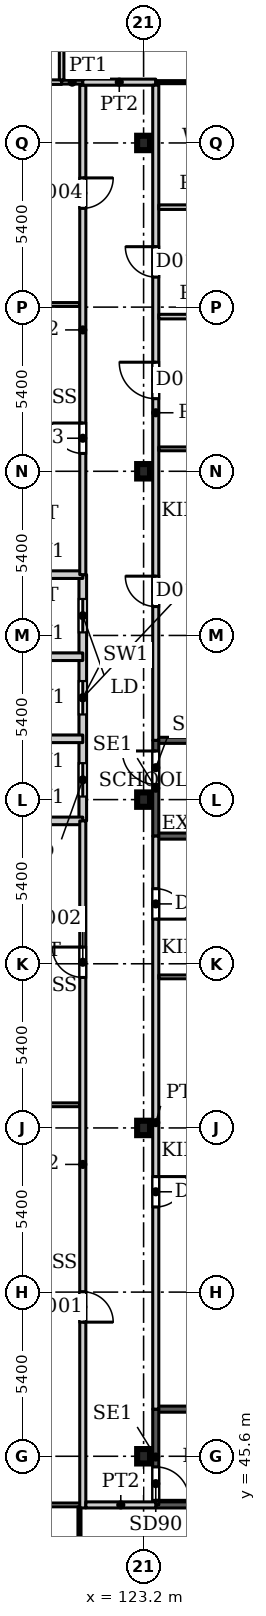
"""IFC4 building model, lengths in metres.
Left out: names, types, materials, properties, quantities, classifications, styles, units other than length and angle.
Written with IfcOpenShell. Run it as: python <this file> out.ifc"""

import sys

from ifc_helpers import new_model, si_unit, direction, frame, frame_2d, origin, origin_2d, place, context, subcontext, project, spatial, rectangle, i_section, extrude, source, transform, mapped, element, fill, save


model = new_model("IFC4")
c1 = context("Model", 3, precision=1e-05, world=origin(), true_north=direction((0.0, 1.0)))
c2 = subcontext(c1, "Body", "Model", "MODEL_VIEW")
j1 = project(units=[si_unit("LENGTHUNIT", "METRE"), si_unit("PLANEANGLEUNIT", "RADIAN")], contexts=[c1])
p1 = place(None, origin())
s1 = spatial("IfcSite", under=j1, at=p1, CompositionType="ELEMENT")
p2 = place(p1, origin())
s2 = spatial("IfcBuilding", under=s1, at=p2, CompositionType="ELEMENT")
p3 = place(p2, frame((0.0, 0.0, 7.5)))
s3 = spatial("IfcBuildingStorey", under=s2, at=p3, CompositionType="ELEMENT", Elevation=7.5)
for number, where, z_axis, x_axis in (
    (1, (123.2, 45.6, 0.0), (0.0, 0.0, 1.0), (1.0, 0.0, 0.0)),
    (2, (123.2, 56.4, 0.0), (0.0, 0.0, 1.0), (1.0, 0.0, 0.0)),
    (3, (123.2, 67.2, 0.0), (0.0, 0.0, 1.0), (1.0, 0.0, 0.0)),
    (4, (123.2, 78.0, 0.0), (0.0, 0.0, 1.0), (1.0, 0.0, 0.0)),
    (5, (123.2, 88.8, 0.0), (0.0, 0.0, 1.0), (1.0, 0.0, 0.0)),
):
    element("IfcColumn", number, at=place(p3, frame(where, z_axis=z_axis, x_axis=x_axis)), inside=s3, PredefinedType="COLUMN", context=c2, shape_type="SweptSolid", body=[
        extrude(i_section(OverallWidth=0.424, OverallDepth=0.474, WebThickness=0.048, FlangeThickness=0.077, FilletRadius=0.014, at=origin_2d()), origin(), (0.0, 0.0, 1.0), 5.0),
    ])
p4 = place(p3, frame((121.2, 66.5, 0.0), z_axis=(0.0, 0.0, 1.0), x_axis=(0.0, 1.0, 0.0)))
e6 = element("IfcWall", 6, at=p4, inside=s3, PredefinedType="PARTITIONING", context=c2, shape_type="SweptSolid", body=[
    extrude(rectangle(XDim=8.1, YDim=0.25, at=frame_2d((4.05, 0.0))), origin(), (0.0, 0.0, 1.0), 5.0),
])
p5 = place(p4, frame((0.8, 0.0, 0.0)))
e7 = element("IfcOpeningElement", 7, at=p5, cuts=e6, PredefinedType="OPENING", context=c2, shape_type="SweptSolid", body=[
    extrude(rectangle(XDim=1.1, YDim=2.2, at=frame_2d((0.55, 1.1))), frame((0.0, 0.135, 0.0), z_axis=(0.0, -1.0, 0.0), x_axis=(1.0, 0.0, 0.0)), (0.0, 0.0, 1.0), 0.27),
])
p6 = place(p4, frame((3.5, 0.0, 0.0)))
e8 = element("IfcOpeningElement", 8, at=p6, cuts=e6, PredefinedType="OPENING", context=c2, shape_type="SweptSolid", body=[
    extrude(rectangle(XDim=1.1, YDim=2.2, at=frame_2d((0.55, 1.1))), frame((0.0, 0.135, 0.0), z_axis=(0.0, -1.0, 0.0), x_axis=(1.0, 0.0, 0.0)), (0.0, 0.0, 1.0), 0.27),
])
p7 = place(p4, frame((6.2, 0.0, 0.0)))
e9 = element("IfcOpeningElement", 9, at=p7, cuts=e6, PredefinedType="OPENING", context=c2, shape_type="SweptSolid", body=[
    extrude(rectangle(XDim=1.1, YDim=2.2, at=frame_2d((0.55, 1.1))), frame((0.0, 0.135, 0.0), z_axis=(0.0, -1.0, 0.0), x_axis=(1.0, 0.0, 0.0)), (0.0, 0.0, 1.0), 0.27),
])
for number, where, z_axis, x_axis in (
    (10, (118.5, 66.5, 0.0), (0.0, 0.0, 1.0), (1.0, 0.0, 0.0)),
    (11, (118.5, 69.2, 0.0), (0.0, 0.0, 1.0), (1.0, 0.0, 0.0)),
    (12, (118.5, 71.9, 0.0), (0.0, 0.0, 1.0), (1.0, 0.0, 0.0)),
    (13, (118.5, 74.6, 0.0), (0.0, 0.0, 1.0), (1.0, 0.0, 0.0)),
):
    element("IfcWall", number, at=place(p3, frame(where, z_axis=z_axis, x_axis=x_axis)), inside=s3, PredefinedType="PARTITIONING", context=c2, shape_type="SweptSolid", body=[
        extrude(rectangle(XDim=2.7, YDim=0.25, at=frame_2d((1.35, 0.0))), origin(), (0.0, 0.0, 1.0), 5.0),
    ])
p8 = place(p3, frame((123.6, 44.0, 0.0), z_axis=(0.0, 0.0, 1.0), x_axis=(1.0, 0.0, 0.0)))
e14 = element("IfcWall", 14, at=p8, inside=s3, PredefinedType="SHEAR", context=c2, shape_type="SweptSolid", body=[
    extrude(rectangle(XDim=7.2, YDim=0.2, at=frame_2d((3.6, 0.0))), origin(), (0.0, 0.0, 1.0), 5.0),
])
p9 = place(p3, frame((123.6, 47.15, 0.0), z_axis=(0.0, 0.0, 1.0), x_axis=(1.0, 0.0, 0.0)))
e15 = element("IfcWall", 15, at=p9, inside=s3, PredefinedType="SHEAR", context=c2, shape_type="SweptSolid", body=[
    extrude(rectangle(XDim=8.4, YDim=0.2, at=frame_2d((4.2, 0.0))), origin(), (0.0, 0.0, 1.0), 5.0),
])
p10 = place(p3, frame((123.6, 44.0, 0.0), z_axis=(0.0, 0.0, 1.0), x_axis=(0.0, 1.0, 0.0)))
e16 = element("IfcWall", 16, at=p10, inside=s3, PredefinedType="SHEAR", context=c2, shape_type="SweptSolid", body=[
    extrude(rectangle(XDim=3.15, YDim=0.2, at=frame_2d((1.575, 0.0))), origin(), (0.0, 0.0, 1.0), 5.0),
])
p11 = place(p10, frame((0.15, 0.0, 0.0)))
e17 = element("IfcOpeningElement", 17, at=p11, cuts=e16, PredefinedType="OPENING", context=c2, shape_type="SweptSolid", body=[
    extrude(rectangle(XDim=1.1, YDim=2.2, at=frame_2d((0.55, 1.1))), frame((0.0, 0.11, 0.0), z_axis=(0.0, -1.0, 0.0), x_axis=(1.0, 0.0, 0.0)), (0.0, 0.0, 1.0), 0.22),
])
p12 = place(p3, frame((123.6, 66.0, 0.0), z_axis=(0.0, 0.0, 1.0), x_axis=(1.0, 0.0, 0.0)))
e18 = element("IfcWall", 18, at=p12, inside=s3, PredefinedType="SHEAR", context=c2, shape_type="SweptSolid", body=[
    extrude(rectangle(XDim=7.2, YDim=0.2, at=frame_2d((3.6, 0.0))), origin(), (0.0, 0.0, 1.0), 5.0),
])
p13 = place(p3, frame((123.6, 69.15, 0.0), z_axis=(0.0, 0.0, 1.0), x_axis=(1.0, 0.0, 0.0)))
e19 = element("IfcWall", 19, at=p13, inside=s3, PredefinedType="SHEAR", context=c2, shape_type="SweptSolid", body=[
    extrude(rectangle(XDim=8.4, YDim=0.2, at=frame_2d((4.2, 0.0))), origin(), (0.0, 0.0, 1.0), 5.0),
])
p14 = place(p3, frame((123.6, 66.0, 0.0), z_axis=(0.0, 0.0, 1.0), x_axis=(0.0, 1.0, 0.0)))
e20 = element("IfcWall", 20, at=p14, inside=s3, PredefinedType="SHEAR", context=c2, shape_type="SweptSolid", body=[
    extrude(rectangle(XDim=3.15, YDim=0.2, at=frame_2d((1.575, 0.0))), origin(), (0.0, 0.0, 1.0), 5.0),
])
p15 = place(p14, frame((1.7, 0.0, 0.0)))
e21 = element("IfcOpeningElement", 21, at=p15, cuts=e20, PredefinedType="OPENING", context=c2, shape_type="SweptSolid", body=[
    extrude(rectangle(XDim=1.1, YDim=2.2, at=frame_2d((0.55, 1.1))), frame((0.0, 0.11, 0.0), z_axis=(0.0, -1.0, 0.0), x_axis=(1.0, 0.0, 0.0)), (0.0, 0.0, 1.0), 0.22),
])
p16 = place(p3, frame((110.183, 90.8, 0.0), z_axis=(0.0, 0.0, 1.0), x_axis=(1.0, 0.0, 0.0)))
e22 = element("IfcWall", 22, at=p16, inside=s3, PredefinedType="PARTITIONING", context=c2, shape_type="SweptSolid", body=[
    extrude(rectangle(XDim=10.321, YDim=0.15, at=frame_2d((5.16, 0.0))), origin(), (0.0, 0.0, 1.0), 4.68),
])
p17 = place(p3, frame((112.862, 44.0, 0.0), z_axis=(0.0, 0.0, 1.0), x_axis=(1.0, 0.0, 0.0)))
e23 = element("IfcWall", 23, at=p17, inside=s3, PredefinedType="PARTITIONING", context=c2, shape_type="SweptSolid", body=[
    extrude(rectangle(XDim=8.279, YDim=0.125, at=frame_2d((4.14, 0.0))), origin(), (0.0, 0.0, 1.0), 4.68),
])
for number, where, z_axis, x_axis in (
    (24, (112.862, 57.162, 0.0), (0.0, 0.0, 1.0), (1.0, 0.0, 0.0)),
    (25, (112.862, 83.487, 0.0), (0.0, 0.0, 1.0), (1.0, 0.0, 0.0)),
):
    element("IfcWall", number, at=place(p3, frame(where, z_axis=z_axis, x_axis=x_axis)), inside=s3, PredefinedType="PARTITIONING", context=c2, shape_type="SweptSolid", body=[
        extrude(rectangle(XDim=8.238, YDim=0.125, at=frame_2d((4.119, 0.0))), origin(), (0.0, 0.0, 1.0), 4.68),
    ])
p18 = place(p3, frame((120.504, 90.8, 0.0), z_axis=(0.0, 0.0, 1.0), x_axis=(1.0, 0.0, 0.0)))
e26 = element("IfcWall", 26, at=p18, inside=s3, PredefinedType="PARTITIONING", context=c2, shape_type="SweptSolid", body=[
    extrude(rectangle(XDim=0.696, YDim=0.125, at=frame_2d((0.348, 0.0))), origin(), (0.0, 0.0, 1.0), 4.68),
])
p19 = place(p3, frame((120.504, 90.875, 0.0), z_axis=(0.0, 0.0, 1.0), x_axis=(0.0, 1.0, 0.0)))
e27 = element("IfcWall", 27, at=p19, inside=s3, PredefinedType="PARTITIONING", context=c2, shape_type="SweptSolid", body=[
    extrude(rectangle(XDim=8.225, YDim=0.15, at=frame_2d((4.113, 0.0))), origin(), (0.0, 0.0, 1.0), 4.68),
])
p20 = place(p3, frame((121.091, 35.3, 0.0), z_axis=(0.0, 0.0, 1.0), x_axis=(0.0, 1.0, 0.0)))
e28 = element("IfcWall", 28, at=p20, inside=s3, PredefinedType="PARTITIONING", context=c2, shape_type="SweptSolid", body=[
    extrude(rectangle(XDim=8.638, YDim=0.1, at=frame_2d((4.319, 0.0))), origin(), (0.0, 0.0, 1.0), 4.68),
])
p21 = place(p3, frame((121.2, 43.9, 0.0), z_axis=(0.0, 0.0, 1.0), x_axis=(0.0, 1.0, 0.0)))
e29 = element("IfcWall", 29, at=p21, inside=s3, PredefinedType="PARTITIONING", context=c2, shape_type="SweptSolid", body=[
    extrude(rectangle(XDim=22.6, YDim=0.2, at=frame_2d((11.3, 0.0))), origin(), (0.0, 0.0, 1.0), 4.68),
])
p22 = place(p21, frame((6.112, 0.0, 0.0)))
e30 = element("IfcOpeningElement", 30, at=p22, cuts=e29, PredefinedType="OPENING", context=c2, shape_type="SweptSolid", body=[
    extrude(rectangle(XDim=1.0, YDim=2.1, at=frame_2d((0.5, 1.05))), frame((0.0, 0.11, 0.0), z_axis=(0.0, -1.0, 0.0), x_axis=(1.0, 0.0, 0.0)), (0.0, 0.0, 1.0), 0.22),
])
p23 = place(p21, frame((17.45, 0.0, 0.0)))
e31 = element("IfcOpeningElement", 31, at=p23, cuts=e29, PredefinedType="OPENING", context=c2, shape_type="SweptSolid", body=[
    extrude(rectangle(XDim=1.0, YDim=2.1, at=frame_2d((0.5, 1.05))), frame((0.0, 0.11, 0.0), z_axis=(0.0, -1.0, 0.0), x_axis=(1.0, 0.0, 0.0)), (0.0, 0.0, 1.0), 0.22),
])
p24 = place(p3, frame((121.2, 74.6, 0.0), z_axis=(0.0, 0.0, 1.0), x_axis=(0.0, 1.0, 0.0)))
e32 = element("IfcWall", 32, at=p24, inside=s3, PredefinedType="PARTITIONING", context=c2, shape_type="SweptSolid", body=[
    extrude(rectangle(XDim=16.1, YDim=0.2, at=frame_2d((8.05, 0.0))), origin(), (0.0, 0.0, 1.0), 4.68),
])
p25 = place(p24, frame((3.987, 0.0, 0.0)))
e33 = element("IfcOpeningElement", 33, at=p25, cuts=e32, PredefinedType="OPENING", context=c2, shape_type="SweptSolid", body=[
    extrude(rectangle(XDim=1.0, YDim=2.1, at=frame_2d((0.5, 1.05))), frame((0.0, 0.11, 0.0), z_axis=(0.0, -1.0, 0.0), x_axis=(1.0, 0.0, 0.0)), (0.0, 0.0, 1.0), 0.22),
])
p26 = place(p24, frame((12.05, 0.0, 0.0)))
e34 = element("IfcOpeningElement", 34, at=p26, cuts=e32, PredefinedType="OPENING", context=c2, shape_type="SweptSolid", body=[
    extrude(rectangle(XDim=1.0, YDim=2.1, at=frame_2d((0.5, 1.05))), frame((0.0, 0.11, 0.0), z_axis=(0.0, -1.0, 0.0), x_axis=(1.0, 0.0, 0.0)), (0.0, 0.0, 1.0), 0.22),
])
p27 = place(p3, frame((121.2, 90.8, 0.0), z_axis=(0.0, 0.0, 1.0), x_axis=(1.0, 0.0, 0.0)))
e35 = element("IfcWall", 35, at=p27, inside=s3, PredefinedType="PARTITIONING", context=c2, shape_type="SweptSolid", body=[
    extrude(rectangle(XDim=2.4, YDim=0.2, at=frame_2d((1.2, 0.0))), origin(), (0.0, 0.0, 1.0), 4.68),
])
p28 = place(p3, frame((121.3, 44.0, 0.0), z_axis=(0.0, 0.0, 1.0), x_axis=(1.0, 0.0, 0.0)))
e36 = element("IfcWall", 36, at=p28, inside=s3, PredefinedType="PARTITIONING", context=c2, shape_type="SweptSolid", body=[
    extrude(rectangle(XDim=2.3, YDim=0.2, at=frame_2d((1.15, 0.0))), origin(), (0.0, 0.0, 1.0), 4.68),
])
p29 = place(p3, frame((123.6, 47.15, 0.0), z_axis=(0.0, 0.0, 1.0), x_axis=(0.0, 1.0, 0.0)))
e37 = element("IfcWall", 37, at=p29, inside=s3, PredefinedType="PARTITIONING", context=c2, shape_type="SweptSolid", body=[
    extrude(rectangle(XDim=18.85, YDim=0.2, at=frame_2d((9.425, 0.0))), origin(), (0.0, 0.0, 1.0), 4.68),
])
p30 = place(p29, frame((6.65, 0.0, 0.0)))
e38 = element("IfcOpeningElement", 38, at=p30, cuts=e37, PredefinedType="OPENING", context=c2, shape_type="SweptSolid", body=[
    extrude(rectangle(XDim=1.0, YDim=2.1, at=frame_2d((0.5, 1.05))), frame((0.0, 0.11, 0.0), z_axis=(0.0, -1.0, 0.0), x_axis=(1.0, 0.0, 0.0)), (0.0, 0.0, 1.0), 0.22),
])
p31 = place(p29, frame((16.119, 0.0, 0.0)))
e39 = element("IfcOpeningElement", 39, at=p31, cuts=e37, PredefinedType="OPENING", context=c2, shape_type="SweptSolid", body=[
    extrude(rectangle(XDim=1.0, YDim=2.1, at=frame_2d((0.5, 1.05))), frame((0.0, 0.11, 0.0), z_axis=(0.0, -1.0, 0.0), x_axis=(1.0, 0.0, 0.0)), (0.0, 0.0, 1.0), 0.22),
])
p32 = place(p3, frame((123.6, 69.15, 0.0), z_axis=(0.0, 0.0, 1.0), x_axis=(0.0, 1.0, 0.0)))
e40 = element("IfcWall", 40, at=p32, inside=s3, PredefinedType="PARTITIONING", context=c2, shape_type="SweptSolid", body=[
    extrude(rectangle(XDim=21.55, YDim=0.2, at=frame_2d((10.775, 0.0))), origin(), (0.0, 0.0, 1.0), 4.68),
])
p33 = place(p32, frame((4.4, 0.0, 0.0)))
e41 = element("IfcOpeningElement", 41, at=p33, cuts=e40, PredefinedType="OPENING", context=c2, shape_type="SweptSolid", body=[
    extrude(rectangle(XDim=1.0, YDim=2.1, at=frame_2d((0.5, 1.05))), frame((0.0, 0.11, 0.0), z_axis=(0.0, -1.0, 0.0), x_axis=(1.0, 0.0, 0.0)), (0.0, 0.0, 1.0), 0.22),
])
p34 = place(p32, frame((15.238, 0.0, 0.0)))
e42 = element("IfcOpeningElement", 42, at=p34, cuts=e40, PredefinedType="OPENING", context=c2, shape_type="SweptSolid", body=[
    extrude(rectangle(XDim=1.0, YDim=2.1, at=frame_2d((0.5, 1.05))), frame((0.0, 0.11, 0.0), z_axis=(0.0, -1.0, 0.0), x_axis=(1.0, 0.0, 0.0)), (0.0, 0.0, 1.0), 0.22),
])
p35 = place(p32, frame((11.238, 0.0, 0.0)))
e43 = element("IfcOpeningElement", 43, at=p35, cuts=e40, PredefinedType="OPENING", context=c2, shape_type="SweptSolid", body=[
    extrude(rectangle(XDim=1.2, YDim=2.1, at=frame_2d((0.6, 1.05))), frame((0.0, 0.11, 0.0), z_axis=(0.0, -1.0, 0.0), x_axis=(1.0, 0.0, 0.0)), (0.0, 0.0, 1.0), 0.22),
])
p36 = place(p3, frame((123.6, 90.8, 0.0), z_axis=(0.0, 0.0, 1.0), x_axis=(1.0, 0.0, 0.0)))
e44 = element("IfcWall", 44, at=p36, inside=s3, PredefinedType="PARTITIONING", context=c2, shape_type="SweptSolid", body=[
    extrude(rectangle(XDim=8.4, YDim=0.1, at=frame_2d((4.2, 0.0))), origin(), (0.0, 0.0, 1.0), 4.68),
])
for number, where, z_axis, x_axis in (
    (45, (123.7, 61.369, 0.0), (0.0, 0.0, 1.0), (1.0, 0.0, 0.0)),
    (46, (123.7, 78.738, 0.0), (0.0, 0.0, 1.0), (1.0, 0.0, 0.0)),
):
    element("IfcWall", number, at=place(p3, frame(where, z_axis=z_axis, x_axis=x_axis)), inside=s3, PredefinedType="PARTITIONING", context=c2, shape_type="SweptSolid", body=[
        extrude(rectangle(XDim=8.3, YDim=0.125, at=frame_2d((4.15, 0.0))), origin(), (0.0, 0.0, 1.0), 4.68),
    ])
for number, where, z_axis, x_axis in (
    (47, (123.7, 83.088, 0.0), (0.0, 0.0, 1.0), (1.0, 0.0, 0.0)),
    (48, (123.7, 86.688, 0.0), (0.0, 0.0, 1.0), (1.0, 0.0, 0.0)),
):
    element("IfcWall", number, at=place(p3, frame(where, z_axis=z_axis, x_axis=x_axis)), inside=s3, PredefinedType="PARTITIONING", context=c2, shape_type="SweptSolid", body=[
        extrude(rectangle(XDim=3.025, YDim=0.15, at=frame_2d((1.513, 0.0))), origin(), (0.0, 0.0, 1.0), 4.68),
    ])
m1 = source(origin(), c2, "Body", "SweptSolid", [
    extrude(rectangle(XDim=1.1, YDim=2.2, at=frame_2d((0.55, 1.1))), frame((0.0, 0.025, 0.0), z_axis=(0.0, -1.0, 0.0), x_axis=(1.0, 0.0, 0.0)), (0.0, 0.0, 1.0), 0.05),
])
p37 = place(p5, origin())
e49 = element("IfcDoor", 49, at=p37, inside=s3, OperationType="SLIDING_TO_LEFT", PredefinedType="DOOR", context=c2, shape_type="MappedRepresentation", body=[
    mapped(m1, transform((0.0, 0.0, 0.0), x_axis=(1.0, 0.0, 0.0), y_axis=(0.0, 1.0, 0.0), z_axis=(0.0, 0.0, 1.0), scale=1.0)),
])
fill(e7, e49)
p38 = place(p6, origin())
e50 = element("IfcDoor", 50, at=p38, inside=s3, OperationType="SLIDING_TO_LEFT", PredefinedType="DOOR", context=c2, shape_type="MappedRepresentation", body=[
    mapped(m1, transform((0.0, 0.0, 0.0), x_axis=(1.0, 0.0, 0.0), y_axis=(0.0, 1.0, 0.0), z_axis=(0.0, 0.0, 1.0), scale=1.0)),
])
fill(e8, e50)
p39 = place(p7, origin())
e51 = element("IfcDoor", 51, at=p39, inside=s3, OperationType="SLIDING_TO_LEFT", PredefinedType="DOOR", context=c2, shape_type="MappedRepresentation", body=[
    mapped(m1, transform((0.0, 0.0, 0.0), x_axis=(1.0, 0.0, 0.0), y_axis=(0.0, 1.0, 0.0), z_axis=(0.0, 0.0, 1.0), scale=1.0)),
])
fill(e9, e51)
m2 = source(origin(), c2, "Body", "SweptSolid", [
    extrude(rectangle(XDim=1.1, YDim=2.2, at=frame_2d((0.55, 1.1))), frame((0.0, 0.025, 0.0), z_axis=(0.0, -1.0, 0.0), x_axis=(1.0, 0.0, 0.0)), (0.0, 0.0, 1.0), 0.05),
])
p40 = place(p11, origin())
e52 = element("IfcDoor", 52, at=p40, inside=s3, OperationType="SINGLE_SWING_RIGHT", PredefinedType="DOOR", context=c2, shape_type="MappedRepresentation", body=[
    mapped(m2, transform((0.0, 0.0, 0.0), x_axis=(1.0, 0.0, 0.0), y_axis=(0.0, 1.0, 0.0), z_axis=(0.0, 0.0, 1.0), scale=1.0)),
])
fill(e17, e52)
p41 = place(p15, origin())
e53 = element("IfcDoor", 53, at=p41, inside=s3, OperationType="SINGLE_SWING_LEFT", PredefinedType="DOOR", context=c2, shape_type="MappedRepresentation", body=[
    mapped(m2, transform((0.0, 0.0, 0.0), x_axis=(1.0, 0.0, 0.0), y_axis=(0.0, 1.0, 0.0), z_axis=(0.0, 0.0, 1.0), scale=1.0)),
])
fill(e21, e53)
m3 = source(origin(), c2, "Body", "SweptSolid", [
    extrude(rectangle(XDim=1.0, YDim=2.1, at=frame_2d((0.5, 1.05))), frame((0.0, 0.025, 0.0), z_axis=(0.0, -1.0, 0.0), x_axis=(1.0, 0.0, 0.0)), (0.0, 0.0, 1.0), 0.05),
])
p42 = place(p22, origin())
e54 = element("IfcDoor", 54, at=p42, inside=s3, OperationType="SINGLE_SWING_RIGHT", PredefinedType="DOOR", context=c2, shape_type="MappedRepresentation", body=[
    mapped(m3, transform((0.0, 0.0, 0.0), x_axis=(1.0, 0.0, 0.0), y_axis=(0.0, 1.0, 0.0), z_axis=(0.0, 0.0, 1.0), scale=1.0)),
])
fill(e30, e54)
p43 = place(p23, origin())
e55 = element("IfcDoor", 55, at=p43, inside=s3, OperationType="SINGLE_SWING_LEFT", PredefinedType="DOOR", context=c2, shape_type="MappedRepresentation", body=[
    mapped(m3, transform((0.0, 0.0, 0.0), x_axis=(1.0, 0.0, 0.0), y_axis=(0.0, 1.0, 0.0), z_axis=(0.0, 0.0, 1.0), scale=1.0)),
])
fill(e31, e55)
p44 = place(p25, origin())
e56 = element("IfcDoor", 56, at=p44, inside=s3, OperationType="SINGLE_SWING_LEFT", PredefinedType="DOOR", context=c2, shape_type="MappedRepresentation", body=[
    mapped(m3, transform((0.0, 0.0, 0.0), x_axis=(1.0, 0.0, 0.0), y_axis=(0.0, 1.0, 0.0), z_axis=(0.0, 0.0, 1.0), scale=1.0)),
])
fill(e33, e56)
p45 = place(p26, origin())
e57 = element("IfcDoor", 57, at=p45, inside=s3, OperationType="SINGLE_SWING_RIGHT", PredefinedType="DOOR", context=c2, shape_type="MappedRepresentation", body=[
    mapped(m3, transform((0.0, 0.0, 0.0), x_axis=(1.0, 0.0, 0.0), y_axis=(0.0, 1.0, 0.0), z_axis=(0.0, 0.0, 1.0), scale=1.0)),
])
fill(e34, e57)
p46 = place(p30, origin())
e58 = element("IfcDoor", 58, at=p46, inside=s3, OperationType="SINGLE_SWING_RIGHT", PredefinedType="DOOR", context=c2, shape_type="MappedRepresentation", body=[
    mapped(m3, transform((0.0, 0.0, 0.0), x_axis=(1.0, 0.0, 0.0), y_axis=(0.0, 1.0, 0.0), z_axis=(0.0, 0.0, 1.0), scale=1.0)),
])
fill(e38, e58)
p47 = place(p31, origin())
e59 = element("IfcDoor", 59, at=p47, inside=s3, OperationType="SINGLE_SWING_RIGHT", PredefinedType="DOOR", context=c2, shape_type="MappedRepresentation", body=[
    mapped(m3, transform((0.0, 0.0, 0.0), x_axis=(1.0, 0.0, 0.0), y_axis=(0.0, 1.0, 0.0), z_axis=(0.0, 0.0, 1.0), scale=1.0)),
])
fill(e39, e59)
p48 = place(p33, origin())
e60 = element("IfcDoor", 60, at=p48, inside=s3, OperationType="SINGLE_SWING_LEFT", PredefinedType="DOOR", context=c2, shape_type="MappedRepresentation", body=[
    mapped(m3, transform((0.0, 0.0, 0.0), x_axis=(1.0, 0.0, 0.0), y_axis=(0.0, 1.0, 0.0), z_axis=(0.0, 0.0, 1.0), scale=1.0)),
])
fill(e41, e60)
p49 = place(p34, origin())
e61 = element("IfcDoor", 61, at=p49, inside=s3, OperationType="SINGLE_SWING_LEFT", PredefinedType="DOOR", context=c2, shape_type="MappedRepresentation", body=[
    mapped(m3, transform((0.0, 0.0, 0.0), x_axis=(1.0, 0.0, 0.0), y_axis=(0.0, 1.0, 0.0), z_axis=(0.0, 0.0, 1.0), scale=1.0)),
])
fill(e42, e61)
m4 = source(origin(), c2, "Body", "SweptSolid", [
    extrude(rectangle(XDim=1.2, YDim=2.1, at=frame_2d((0.6, 1.05))), frame((0.0, 0.025, 0.0), z_axis=(0.0, -1.0, 0.0), x_axis=(1.0, 0.0, 0.0)), (0.0, 0.0, 1.0), 0.05),
])
p50 = place(p35, origin())
e62 = element("IfcDoor", 62, at=p50, inside=s3, OperationType="SINGLE_SWING_LEFT", PredefinedType="DOOR", context=c2, shape_type="MappedRepresentation", body=[
    mapped(m4, transform((0.0, 0.0, 0.0), x_axis=(1.0, 0.0, 0.0), y_axis=(0.0, 1.0, 0.0), z_axis=(0.0, 0.0, 1.0), scale=1.0)),
])
fill(e43, e62)
save(model, sys.argv[1])
